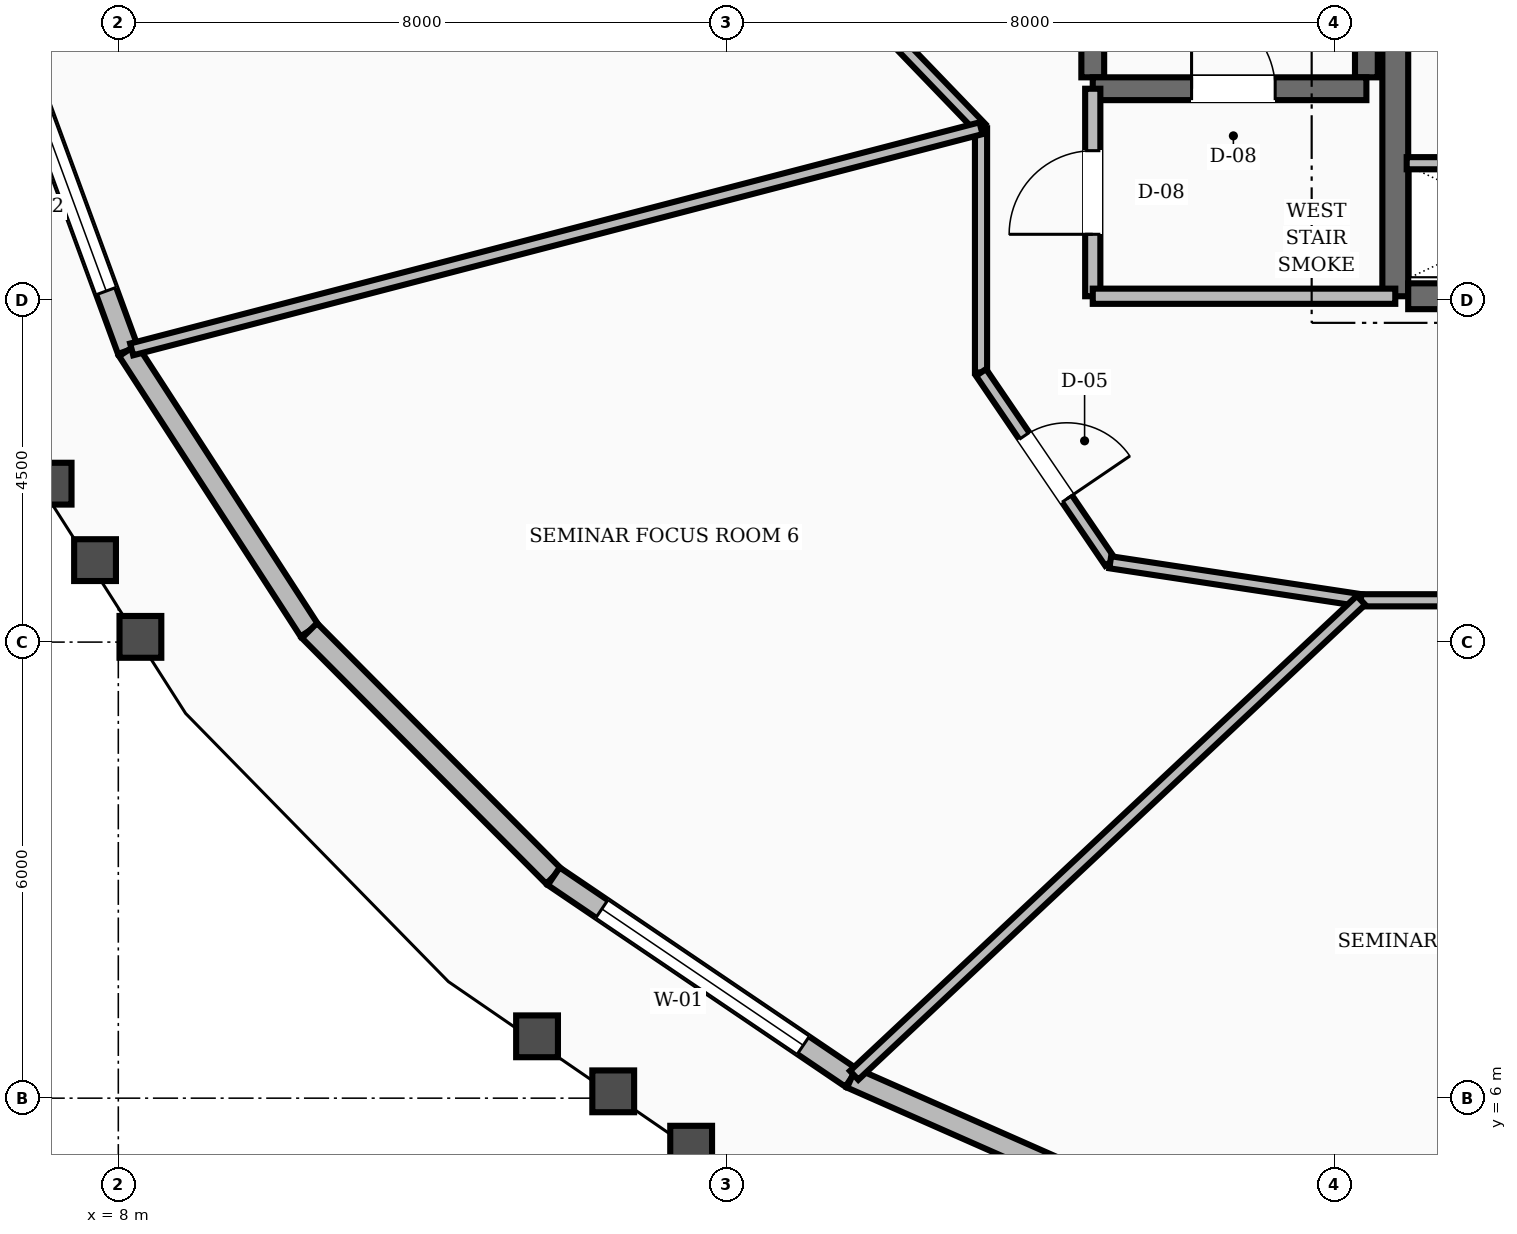
"""IFC4 building model, lengths in metres.
Left out: names, types, materials, properties, quantities, classifications, styles, units other than length and angle.
Written with IfcOpenShell. Run it as: python <this file> out.ifc"""

import sys

from ifc_helpers import new_model, si_unit, direction, frame, frame_2d, origin, place, context, subcontext, project, spatial, rectangle, extrude, element, fill, save


model = new_model("IFC4")
c1 = context("Model", 3, precision=1e-05, world=origin(), true_north=direction((0.0, 1.0)))
c2 = subcontext(c1, "Body", "Model", "MODEL_VIEW")
j1 = project(units=[si_unit("LENGTHUNIT", "METRE"), si_unit("PLANEANGLEUNIT", "RADIAN")], contexts=[c1])
p1 = place(None, origin())
s1 = spatial("IfcSite", under=j1, at=p1, CompositionType="ELEMENT")
p2 = place(p1, origin())
s2 = spatial("IfcBuilding", under=s1, at=p2, CompositionType="ELEMENT")
p3 = place(p2, frame((0.0, 0.0, 178.4)))
s3 = spatial("IfcBuildingStorey", under=s2, at=p3, CompositionType="ELEMENT", Elevation=178.4)
p4 = place(p3, frame((24.8, 16.55, 0.0), z_axis=(0.0, 0.0, 1.0), x_axis=(0.0, 1.0, 0.0)))
e1 = element("IfcWall", 1, at=p4, inside=s3, PredefinedType="SHEAR", context=c2, shape_type="SweptSolid", body=[
    extrude(rectangle(XDim=6.3, YDim=0.34, at=frame_2d((3.15, 0.0))), origin(), (0.0, 0.0, 1.0), 3.6),
])
p5 = place(p3, frame((24.97, 16.55, 0.0), z_axis=(0.0, 0.0, 1.0), x_axis=(1.0, 0.0, 0.0)))
e2 = element("IfcWall", 2, at=p5, inside=s3, PredefinedType="SHEAR", context=c2, shape_type="SweptSolid", body=[
    extrude(rectangle(XDim=3.23, YDim=0.34, at=frame_2d((1.615, 0.0))), origin(), (0.0, 0.0, 1.0), 3.6),
])
for number, where, z_axis, x_axis in (
    (3, (20.82, 19.43, 0.0), (0.0, 0.0, 1.0), (0.0, 1.0, 0.0)),
    (4, (24.42, 19.43, 0.0), (0.0, 0.0, 1.0), (0.0, 1.0, 0.0)),
):
    element("IfcWall", number, at=place(p3, frame(where, z_axis=z_axis, x_axis=x_axis)), inside=s3, PredefinedType="SHEAR", context=c2, shape_type="SweptSolid", body=[
        extrude(rectangle(XDim=8.74, YDim=0.3, at=frame_2d((4.37, 0.0))), origin(), (0.0, 0.0, 1.0), 3.6),
    ])
p6 = place(p3, frame((20.82, 19.28, 0.0), z_axis=(0.0, 0.0, 1.0), x_axis=(1.0, 0.0, 0.0)))
e5 = element("IfcWall", 5, at=p6, inside=s3, PredefinedType="SHEAR", context=c2, shape_type="SweptSolid", body=[
    extrude(rectangle(XDim=3.6, YDim=0.3, at=frame_2d((1.8, 0.0))), origin(), (0.0, 0.0, 1.0), 3.6),
])
p7 = place(p6, frame((1.3, 0.0, 0.0)))
e6 = element("IfcOpeningElement", 6, at=p7, cuts=e5, PredefinedType="OPENING", context=c2, shape_type="SweptSolid", body=[
    extrude(rectangle(XDim=1.1, YDim=2.1, at=frame_2d((0.55, 1.05))), frame((0.0, 0.16, 0.0), z_axis=(0.0, -1.0, 0.0), x_axis=(1.0, 0.0, 0.0)), (0.0, 0.0, 1.0), 0.32),
])
p8 = place(p3, frame((6.657, 19.839, 0.0), z_axis=(0.0, 0.0, 1.0), x_axis=(0.344964732898, -0.93861564714, 0.0)))
e7 = element("IfcWall", 7, at=p8, inside=s3, PredefinedType="STANDARD", context=c2, shape_type="SweptSolid", body=[
    extrude(rectangle(XDim=4.263, YDim=0.28, at=frame_2d((2.131, 0.0))), origin(), (0.0, 0.0, 1.0), 2.82),
])
p9 = place(p8, frame((0.831, 0.0, 0.8)))
e8 = element("IfcOpeningElement", 8, at=p9, cuts=e7, PredefinedType="OPENING", context=c2, shape_type="SweptSolid", body=[
    extrude(rectangle(XDim=2.6, YDim=1.65, at=frame_2d((1.3, 0.825))), frame((0.0, 0.15, 0.0), z_axis=(0.0, -1.0, 0.0), x_axis=(1.0, 0.0, 0.0)), (0.0, 0.0, 1.0), 0.3),
])
p10 = place(p3, frame((8.127, 15.838, 0.0), z_axis=(0.0, 0.0, 1.0), x_axis=(0.543543905956, -0.839380737388, 0.0)))
e9 = element("IfcWall", 9, at=p10, inside=s3, PredefinedType="STANDARD", context=c2, shape_type="SweptSolid", body=[
    extrude(rectangle(XDim=4.393, YDim=0.28, at=frame_2d((2.196, 0.0))), origin(), (0.0, 0.0, 1.0), 2.82),
])
p11 = place(p3, frame((10.515, 12.151, 0.0), z_axis=(0.0, 0.0, 1.0), x_axis=(0.705095186085, -0.709112669862, 0.0)))
e10 = element("IfcWall", 10, at=p11, inside=s3, PredefinedType="STANDARD", context=c2, shape_type="SweptSolid", body=[
    extrude(rectangle(XDim=4.558, YDim=0.28, at=frame_2d((2.279, 0.0))), origin(), (0.0, 0.0, 1.0), 2.82),
])
p12 = place(p3, frame((13.729, 8.919, 0.0), z_axis=(0.0, 0.0, 1.0), x_axis=(0.827929515697, -0.560832164767, 0.0)))
e11 = element("IfcWall", 11, at=p12, inside=s3, PredefinedType="STANDARD", context=c2, shape_type="SweptSolid", body=[
    extrude(rectangle(XDim=4.729, YDim=0.28, at=frame_2d((2.365, 0.0))), origin(), (0.0, 0.0, 1.0), 2.82),
])
p13 = place(p12, frame((0.765, 0.0, 0.8)))
e12 = element("IfcOpeningElement", 12, at=p13, cuts=e11, PredefinedType="OPENING", context=c2, shape_type="SweptSolid", body=[
    extrude(rectangle(XDim=3.2, YDim=1.65, at=frame_2d((1.6, 0.825))), frame((0.0, 0.15, 0.0), z_axis=(0.0, -1.0, 0.0), x_axis=(1.0, 0.0, 0.0)), (0.0, 0.0, 1.0), 0.3),
])
p14 = place(p3, frame((17.644, 6.267, 0.0), z_axis=(0.0, 0.0, 1.0), x_axis=(0.914919430765, -0.40363651372, 0.0)))
e13 = element("IfcWall", 13, at=p14, inside=s3, PredefinedType="STANDARD", context=c2, shape_type="SweptSolid", body=[
    extrude(rectangle(XDim=4.883, YDim=0.28, at=frame_2d((2.441, 0.0))), origin(), (0.0, 0.0, 1.0), 2.82),
])
p15 = place(p3, frame((20.82, 16.55, 0.0), z_axis=(0.0, 0.0, 1.0), x_axis=(0.0, 1.0, 0.0)))
e14 = element("IfcWall", 14, at=p15, inside=s3, PredefinedType="SOLIDWALL", context=c2, shape_type="SweptSolid", body=[
    extrude(rectangle(XDim=2.73, YDim=0.2, at=frame_2d((1.365, 0.0))), origin(), (0.0, 0.0, 1.0), 2.8),
])
p16 = place(p15, frame((0.815, 0.0, 0.0)))
e15 = element("IfcOpeningElement", 15, at=p16, cuts=e14, PredefinedType="OPENING", context=c2, shape_type="SweptSolid", body=[
    extrude(rectangle(XDim=1.1, YDim=2.1, at=frame_2d((0.55, 1.05))), frame((0.0, 0.11, 0.0), z_axis=(0.0, -1.0, 0.0), x_axis=(1.0, 0.0, 0.0)), (0.0, 0.0, 1.0), 0.22),
])
p17 = place(p3, frame((20.82, 16.55, 0.0), z_axis=(0.0, 0.0, 1.0), x_axis=(1.0, 0.0, 0.0)))
e16 = element("IfcWall", 16, at=p17, inside=s3, PredefinedType="SOLIDWALL", context=c2, shape_type="SweptSolid", body=[
    extrude(rectangle(XDim=3.98, YDim=0.2, at=frame_2d((1.99, 0.0))), origin(), (0.0, 0.0, 1.0), 2.8),
])
p18 = place(p3, frame((24.95, 18.3, 0.0), z_axis=(0.0, 0.0, 1.0), x_axis=(1.0, 0.0, 0.0)))
e17 = element("IfcWall", 17, at=p18, inside=s3, PredefinedType="SOLIDWALL", context=c2, shape_type="SweptSolid", body=[
    extrude(rectangle(XDim=3.2, YDim=0.16, at=frame_2d((1.6, 0.0))), origin(), (0.0, 0.0, 1.0), 2.8),
])
p19 = place(p18, frame((0.44, 0.0, 0.0)))
e18 = element("IfcOpeningElement", 18, at=p19, cuts=e17, PredefinedType="OPENING", context=c2, shape_type="SweptSolid", body=[
    extrude(rectangle(XDim=0.86, YDim=2.05, at=frame_2d((0.43, 1.025))), frame((0.0, 0.09, 0.0), z_axis=(0.0, -1.0, 0.0), x_axis=(1.0, 0.0, 0.0)), (0.0, 0.0, 1.0), 0.18),
])
p20 = place(p3, frame((17.15, 21.046, 0.0), z_axis=(0.0, 0.0, 1.0), x_axis=(0.693473090138, -0.72048252807, 0.0)))
e19 = element("IfcWall", 19, at=p20, inside=s3, PredefinedType="SOLIDWALL", context=c2, shape_type="SweptSolid", body=[
    extrude(rectangle(XDim=3.173, YDim=0.16, at=frame_2d((1.586, 0.0))), origin(), (0.0, 0.0, 1.0), 2.8),
])
p21 = place(p3, frame((19.35, 18.76, 0.0), z_axis=(0.0, 0.0, 1.0), x_axis=(0.0, -1.0, 0.0)))
e20 = element("IfcWall", 20, at=p21, inside=s3, PredefinedType="SOLIDWALL", context=c2, shape_type="SweptSolid", body=[
    extrude(rectangle(XDim=3.213, YDim=0.16, at=frame_2d((1.606, 0.0))), origin(), (0.0, 0.0, 1.0), 2.8),
])
p22 = place(p3, frame((19.35, 15.548, 0.0), z_axis=(0.0, 0.0, 1.0), x_axis=(0.562674669208, -0.826678423955, 0.0)))
e21 = element("IfcWall", 21, at=p22, inside=s3, PredefinedType="SOLIDWALL", context=c2, shape_type="SweptSolid", body=[
    extrude(rectangle(XDim=3.021, YDim=0.16, at=frame_2d((1.511, 0.0))), origin(), (0.0, 0.0, 1.0), 2.8),
])
p23 = place(p22, frame((1.01, 0.0, 0.0)))
e22 = element("IfcOpeningElement", 22, at=p23, cuts=e21, PredefinedType="OPENING", context=c2, shape_type="SweptSolid", body=[
    extrude(rectangle(XDim=1.0, YDim=2.1, at=frame_2d((0.5, 1.05))), frame((0.0, 0.09, 0.0), z_axis=(0.0, -1.0, 0.0), x_axis=(1.0, 0.0, 0.0)), (0.0, 0.0, 1.0), 0.18),
])
p24 = place(p3, frame((21.05, 13.05, 0.0), z_axis=(0.0, 0.0, 1.0), x_axis=(0.988710906508, -0.149835721217, 0.0)))
e23 = element("IfcWall", 23, at=p24, inside=s3, PredefinedType="SOLIDWALL", context=c2, shape_type="SweptSolid", body=[
    extrude(rectangle(XDim=3.337, YDim=0.16, at=frame_2d((1.668, 0.0))), origin(), (0.0, 0.0, 1.0), 2.8),
])
p25 = place(p3, frame((24.349, 12.55, 0.0), z_axis=(0.0, 0.0, 1.0), x_axis=(1.0, 0.0, 0.0)))
e24 = element("IfcWall", 24, at=p25, inside=s3, PredefinedType="SOLIDWALL", context=c2, shape_type="SweptSolid", body=[
    extrude(rectangle(XDim=2.908, YDim=0.16, at=frame_2d((1.454, 0.0))), origin(), (0.0, 0.0, 1.0), 2.8),
])
p26 = place(p3, frame((19.35, 18.76, 0.0), z_axis=(0.0, 0.0, 1.0), x_axis=(-0.967735942842, -0.251966555186, 0.0)))
e25 = element("IfcWall", 25, at=p26, inside=s3, PredefinedType="SOLIDWALL", context=c2, shape_type="SweptSolid", body=[
    extrude(rectangle(XDim=11.547, YDim=0.16, at=frame_2d((5.773, 0.0))), origin(), (0.0, 0.0, 1.0), 2.8),
])
p27 = place(p3, frame((24.349, 12.55, 0.0), z_axis=(0.0, 0.0, 1.0), x_axis=(-0.729668817256, -0.68380071448, 0.0)))
e26 = element("IfcWall", 26, at=p27, inside=s3, PredefinedType="SOLIDWALL", context=c2, shape_type="SweptSolid", body=[
    extrude(rectangle(XDim=9.139, YDim=0.16, at=frame_2d((4.569, 0.0))), origin(), (0.0, 0.0, 1.0), 2.8),
])
p28 = place(p9, origin())
e27 = element("IfcWindow", 27, at=p28, inside=s3, PartitioningType="SINGLE_PANEL", PredefinedType="WINDOW", context=c2, shape_type="SweptSolid", body=[
    extrude(rectangle(XDim=2.6, YDim=1.65, at=frame_2d((1.3, 0.825))), frame((0.0, 0.03, 0.0), z_axis=(0.0, -1.0, 0.0), x_axis=(1.0, 0.0, 0.0)), (0.0, 0.0, 1.0), 0.06),
])
fill(e8, e27)
p29 = place(p13, origin())
e28 = element("IfcWindow", 28, at=p29, inside=s3, PartitioningType="SINGLE_PANEL", PredefinedType="WINDOW", context=c2, shape_type="SweptSolid", body=[
    extrude(rectangle(XDim=3.2, YDim=1.65, at=frame_2d((1.6, 0.825))), frame((0.0, 0.03, 0.0), z_axis=(0.0, -1.0, 0.0), x_axis=(1.0, 0.0, 0.0)), (0.0, 0.0, 1.0), 0.06),
])
fill(e12, e28)
p30 = place(p7, origin())
e29 = element("IfcDoor", 29, at=p30, inside=s3, OperationType="SINGLE_SWING_LEFT", PredefinedType="DOOR", context=c2, shape_type="SweptSolid", body=[
    extrude(rectangle(XDim=1.1, YDim=2.1, at=frame_2d((0.55, 1.05))), frame((0.0, 0.025, 0.0), z_axis=(0.0, -1.0, 0.0), x_axis=(1.0, 0.0, 0.0)), (0.0, 0.0, 1.0), 0.05),
])
fill(e6, e29)
p31 = place(p16, origin())
e30 = element("IfcDoor", 30, at=p31, inside=s3, OperationType="SINGLE_SWING_LEFT", PredefinedType="DOOR", context=c2, shape_type="SweptSolid", body=[
    extrude(rectangle(XDim=1.1, YDim=2.1, at=frame_2d((0.55, 1.05))), frame((0.0, 0.025, 0.0), z_axis=(0.0, -1.0, 0.0), x_axis=(1.0, 0.0, 0.0)), (0.0, 0.0, 1.0), 0.05),
])
fill(e15, e30)
p32 = place(p23, origin())
e31 = element("IfcDoor", 31, at=p32, inside=s3, OperationType="SINGLE_SWING_RIGHT", PredefinedType="DOOR", context=c2, shape_type="SweptSolid", body=[
    extrude(rectangle(XDim=1.0, YDim=2.1, at=frame_2d((0.5, 1.05))), frame((0.0, 0.025, 0.0), z_axis=(0.0, -1.0, 0.0), x_axis=(1.0, 0.0, 0.0)), (0.0, 0.0, 1.0), 0.05),
])
fill(e22, e31)
save(model, sys.argv[1])
